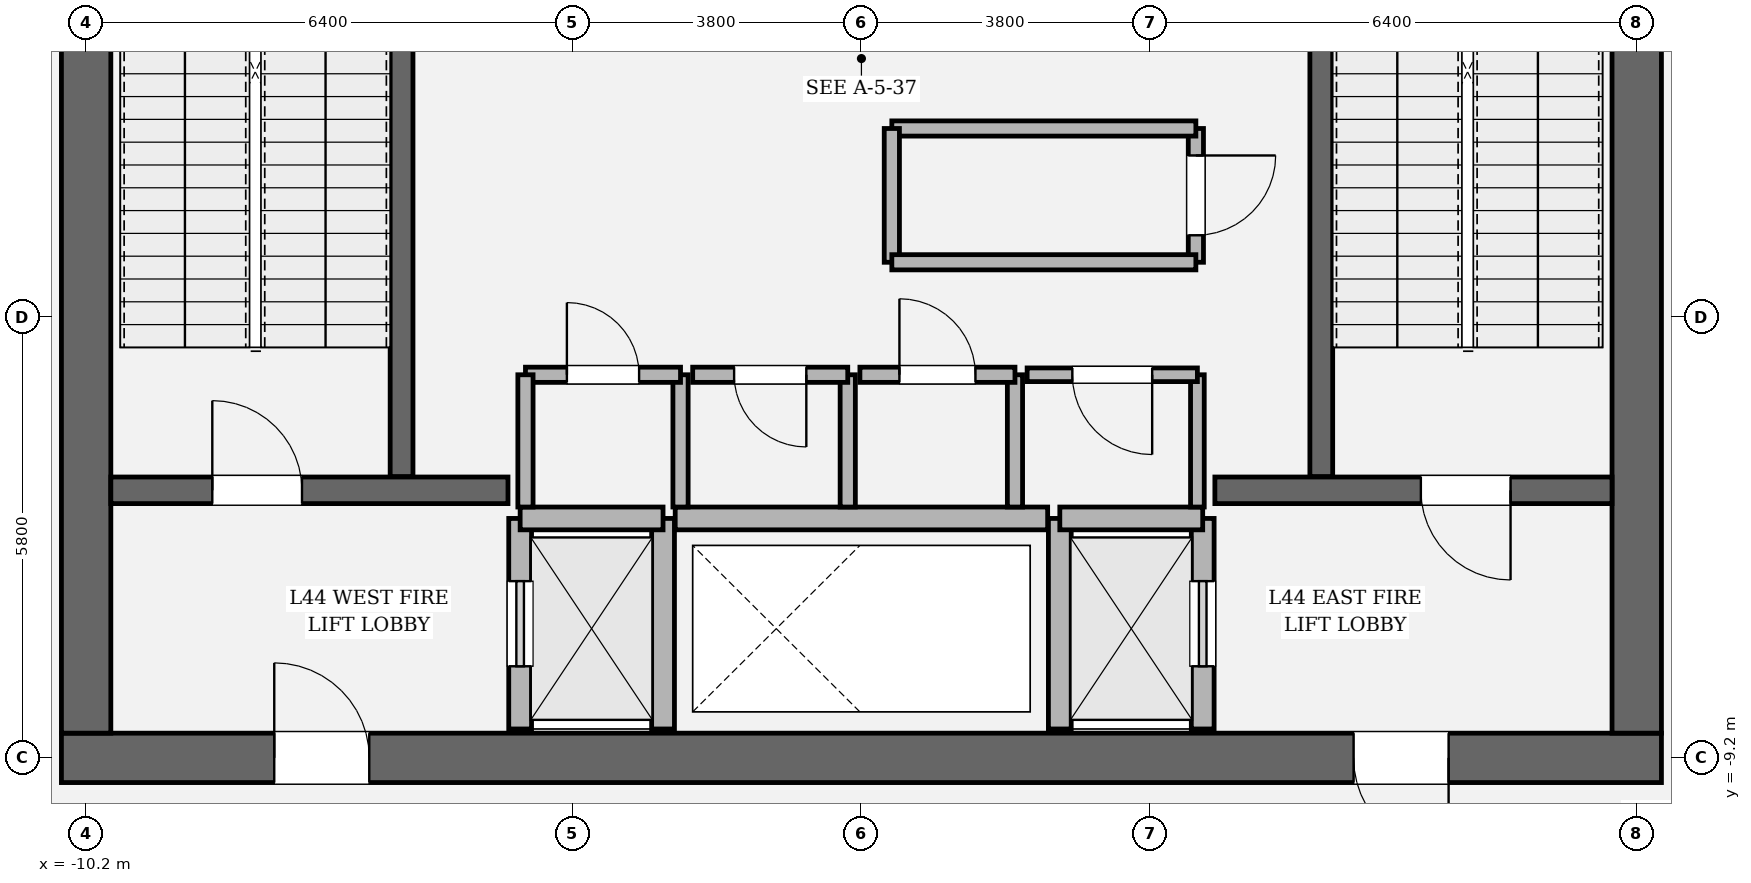
"""IFC4 building model, lengths in metres.
Left out: names, types, materials, properties, quantities, classifications, styles, units other than length and angle.
Written with IfcOpenShell. Run it as: python <this file> out.ifc"""

import sys

from ifc_helpers import new_model, si_unit, direction, frame, frame_2d, origin, place, context, subcontext, project, spatial, rectangle, extrude, element, fill, save


model = new_model("IFC4")
c1 = context("Model", 3, precision=1e-05, world=origin(), true_north=direction((0.0, 1.0)))
c2 = subcontext(c1, "Body", "Model", "MODEL_VIEW")
j1 = project(units=[si_unit("LENGTHUNIT", "METRE"), si_unit("PLANEANGLEUNIT", "RADIAN")], contexts=[c1])
p1 = place(None, origin())
s1 = spatial("IfcSite", under=j1, at=p1, CompositionType="ELEMENT")
p2 = place(p1, origin())
s2 = spatial("IfcBuilding", under=s1, at=p2, CompositionType="ELEMENT")
p3 = place(p2, frame((0.0, 0.0, 188.4)))
s3 = spatial("IfcBuildingStorey", under=s2, at=p3, CompositionType="ELEMENT", Elevation=188.4)
p4 = place(p3, frame((10.525, -9.2, 0.0), z_axis=(0.0, 0.0, 1.0), x_axis=(-1.0, 0.0, 0.0)))
e1 = element("IfcWall", 1, at=p4, inside=s3, PredefinedType="SHEAR", context=c2, shape_type="SweptSolid", body=[
    extrude(rectangle(XDim=21.05, YDim=0.65, at=frame_2d((10.525, 0.0))), origin(), (0.0, 0.0, 1.0), 4.05),
])
p5 = place(p4, frame((2.8, 0.0, 0.0)))
e2 = element("IfcOpeningElement", 2, at=p5, cuts=e1, PredefinedType="OPENING", context=c2, shape_type="SweptSolid", body=[
    extrude(rectangle(XDim=1.25, YDim=2.25, at=frame_2d((0.625, 1.125))), frame((0.0, 0.335, 0.0), z_axis=(0.0, -1.0, 0.0), x_axis=(1.0, 0.0, 0.0)), (0.0, 0.0, 1.0), 0.67),
])
p6 = place(p4, frame((17.0, 0.0, 0.0)))
e3 = element("IfcOpeningElement", 3, at=p6, cuts=e1, PredefinedType="OPENING", context=c2, shape_type="SweptSolid", body=[
    extrude(rectangle(XDim=1.25, YDim=2.25, at=frame_2d((0.625, 1.125))), frame((0.0, 0.335, 0.0), z_axis=(0.0, -1.0, 0.0), x_axis=(1.0, 0.0, 0.0)), (0.0, 0.0, 1.0), 0.67),
])
p7 = place(p3, frame((-10.2, -8.875, 0.0), z_axis=(0.0, 0.0, 1.0), x_axis=(0.0, 1.0, 0.0)))
e4 = element("IfcWall", 4, at=p7, inside=s3, PredefinedType="SHEAR", context=c2, shape_type="SweptSolid", body=[
    extrude(rectangle(XDim=17.75, YDim=0.65, at=frame_2d((8.875, 0.0))), origin(), (0.0, 0.0, 1.0), 4.05),
])
p8 = place(p7, frame((12.665, 0.0, 0.0)))
e5 = element("IfcOpeningElement", 5, at=p8, cuts=e4, PredefinedType="OPENING", context=c2, shape_type="SweptSolid", body=[
    extrude(rectangle(XDim=1.18, YDim=2.2, at=frame_2d((0.59, 1.1))), frame((0.0, 0.335, 0.0), z_axis=(0.0, -1.0, 0.0), x_axis=(1.0, 0.0, 0.0)), (0.0, 0.0, 1.0), 0.67),
])
p9 = place(p3, frame((10.2, 8.875, 0.0), z_axis=(0.0, 0.0, 1.0), x_axis=(0.0, -1.0, 0.0)))
e6 = element("IfcWall", 6, at=p9, inside=s3, PredefinedType="SHEAR", context=c2, shape_type="SweptSolid", body=[
    extrude(rectangle(XDim=17.75, YDim=0.65, at=frame_2d((8.875, 0.0))), origin(), (0.0, 0.0, 1.0), 4.05),
])
p10 = place(p9, frame((3.905, 0.0, 0.0)))
e7 = element("IfcOpeningElement", 7, at=p10, cuts=e6, PredefinedType="OPENING", context=c2, shape_type="SweptSolid", body=[
    extrude(rectangle(XDim=1.18, YDim=2.2, at=frame_2d((0.59, 1.1))), frame((0.0, 0.335, 0.0), z_axis=(0.0, -1.0, 0.0), x_axis=(1.0, 0.0, 0.0)), (0.0, 0.0, 1.0), 0.67),
])
for number, where, z_axis, x_axis in (
    (8, (-6.05, -5.5, 0.0), (0.0, 0.0, 1.0), (0.0, 1.0, 0.0)),
    (9, (6.05, 3.45, 0.0), (0.0, 0.0, 1.0), (0.0, -1.0, 0.0)),
):
    element("IfcWall", number, at=place(p3, frame(where, z_axis=z_axis, x_axis=x_axis)), inside=s3, PredefinedType="SOLIDWALL", context=c2, shape_type="SweptSolid", body=[
        extrude(rectangle(XDim=8.95, YDim=0.3, at=frame_2d((4.475, 0.0))), origin(), (0.0, 0.0, 1.0), 4.05),
    ])
p11 = place(p3, frame((-9.875, -5.68, 0.0), z_axis=(0.0, 0.0, 1.0), x_axis=(1.0, 0.0, 0.0)))
e10 = element("IfcWall", 10, at=p11, inside=s3, PredefinedType="SOLIDWALL", context=c2, shape_type="SweptSolid", body=[
    extrude(rectangle(XDim=5.225, YDim=0.35, at=frame_2d((2.613, 0.0))), origin(), (0.0, 0.0, 1.0), 4.05),
])
p12 = place(p11, frame((1.335, 0.0, 0.0)))
e11 = element("IfcOpeningElement", 11, at=p12, cuts=e10, PredefinedType="OPENING", context=c2, shape_type="SweptSolid", body=[
    extrude(rectangle(XDim=1.18, YDim=2.2, at=frame_2d((0.59, 1.1))), frame((0.0, 0.185, 0.0), z_axis=(0.0, -1.0, 0.0), x_axis=(1.0, 0.0, 0.0)), (0.0, 0.0, 1.0), 0.37),
])
p13 = place(p3, frame((4.65, -5.68, 0.0), z_axis=(0.0, 0.0, 1.0), x_axis=(1.0, 0.0, 0.0)))
e12 = element("IfcWall", 12, at=p13, inside=s3, PredefinedType="SOLIDWALL", context=c2, shape_type="SweptSolid", body=[
    extrude(rectangle(XDim=5.225, YDim=0.35, at=frame_2d((2.613, 0.0))), origin(), (0.0, 0.0, 1.0), 4.05),
])
p14 = place(p13, frame((2.71, 0.0, 0.0)))
e13 = element("IfcOpeningElement", 13, at=p14, cuts=e12, PredefinedType="OPENING", context=c2, shape_type="SweptSolid", body=[
    extrude(rectangle(XDim=1.18, YDim=2.2, at=frame_2d((0.59, 1.1))), frame((0.0, 0.185, 0.0), z_axis=(0.0, -1.0, 0.0), x_axis=(1.0, 0.0, 0.0)), (0.0, 0.0, 1.0), 0.37),
])
p15 = place(p3, frame((-4.49, -8.82, 0.0), z_axis=(0.0, 0.0, 1.0), x_axis=(0.0, 1.0, 0.0)))
e14 = element("IfcWall", 14, at=p15, inside=s3, PredefinedType="SOLIDWALL", context=c2, shape_type="SweptSolid", body=[
    extrude(rectangle(XDim=2.77, YDim=0.3, at=frame_2d((1.385, 0.0))), origin(), (0.0, 0.0, 1.0), 3.83),
])
p16 = place(p15, frame((0.825, 0.0, 0.0)))
e15 = element("IfcOpeningElement", 15, at=p16, cuts=e14, PredefinedType="OPENING", context=c2, shape_type="SweptSolid", body=[
    extrude(rectangle(XDim=1.12, YDim=2.25, at=frame_2d((0.56, 1.125))), frame((0.0, 0.16, 0.0), z_axis=(0.0, -1.0, 0.0), x_axis=(1.0, 0.0, 0.0)), (0.0, 0.0, 1.0), 0.32),
])
p17 = place(p3, frame((-2.61, -8.82, 0.0), z_axis=(0.0, 0.0, 1.0), x_axis=(0.0, 1.0, 0.0)))
e16 = element("IfcWall", 16, at=p17, inside=s3, PredefinedType="SOLIDWALL", context=c2, shape_type="SweptSolid", body=[
    extrude(rectangle(XDim=2.77, YDim=0.3, at=frame_2d((1.385, 0.0))), origin(), (0.0, 0.0, 1.0), 3.83),
])
p18 = place(p3, frame((-4.49, -6.05, 0.0), z_axis=(0.0, 0.0, 1.0), x_axis=(1.0, 0.0, 0.0)))
e17 = element("IfcWall", 17, at=p18, inside=s3, PredefinedType="SOLIDWALL", context=c2, shape_type="SweptSolid", body=[
    extrude(rectangle(XDim=1.88, YDim=0.3, at=frame_2d((0.94, 0.0))), origin(), (0.0, 0.0, 1.0), 3.83),
])
p19 = place(p3, frame((4.49, -8.82, 0.0), z_axis=(0.0, 0.0, 1.0), x_axis=(0.0, 1.0, 0.0)))
e18 = element("IfcWall", 18, at=p19, inside=s3, PredefinedType="SOLIDWALL", context=c2, shape_type="SweptSolid", body=[
    extrude(rectangle(XDim=2.77, YDim=0.3, at=frame_2d((1.385, 0.0))), origin(), (0.0, 0.0, 1.0), 3.83),
])
p20 = place(p19, frame((0.825, 0.0, 0.0)))
e19 = element("IfcOpeningElement", 19, at=p20, cuts=e18, PredefinedType="OPENING", context=c2, shape_type="SweptSolid", body=[
    extrude(rectangle(XDim=1.12, YDim=2.25, at=frame_2d((0.56, 1.125))), frame((0.0, 0.16, 0.0), z_axis=(0.0, -1.0, 0.0), x_axis=(1.0, 0.0, 0.0)), (0.0, 0.0, 1.0), 0.32),
])
p21 = place(p3, frame((2.61, -8.82, 0.0), z_axis=(0.0, 0.0, 1.0), x_axis=(0.0, 1.0, 0.0)))
e20 = element("IfcWall", 20, at=p21, inside=s3, PredefinedType="SOLIDWALL", context=c2, shape_type="SweptSolid", body=[
    extrude(rectangle(XDim=2.77, YDim=0.3, at=frame_2d((1.385, 0.0))), origin(), (0.0, 0.0, 1.0), 3.83),
])
p22 = place(p3, frame((2.61, -6.05, 0.0), z_axis=(0.0, 0.0, 1.0), x_axis=(1.0, 0.0, 0.0)))
e21 = element("IfcWall", 21, at=p22, inside=s3, PredefinedType="SOLIDWALL", context=c2, shape_type="SweptSolid", body=[
    extrude(rectangle(XDim=1.88, YDim=0.3, at=frame_2d((0.94, 0.0))), origin(), (0.0, 0.0, 1.0), 3.83),
])
p23 = place(p3, frame((-2.45, -6.05, 0.0), z_axis=(0.0, 0.0, 1.0), x_axis=(1.0, 0.0, 0.0)))
e22 = element("IfcWall", 22, at=p23, inside=s3, PredefinedType="SOLIDWALL", context=c2, shape_type="SweptSolid", body=[
    extrude(rectangle(XDim=4.9, YDim=0.3, at=frame_2d((2.45, 0.0))), origin(), (0.0, 0.0, 1.0), 3.83),
])
p24 = place(p3, frame((-2.38, -5.9, 0.0), z_axis=(0.0, 0.0, 1.0), x_axis=(0.0, 1.0, 0.0)))
e23 = element("IfcWall", 23, at=p24, inside=s3, PredefinedType="SOLIDWALL", context=c2, shape_type="SweptSolid", body=[
    extrude(rectangle(XDim=1.74, YDim=0.2, at=frame_2d((0.87, 0.0))), origin(), (0.0, 0.0, 1.0), 3.83),
])
p25 = place(p3, frame((-2.38, -4.16, 0.0), z_axis=(0.0, 0.0, 1.0), x_axis=(-1.0, 0.0, 0.0)))
e24 = element("IfcWall", 24, at=p25, inside=s3, PredefinedType="SOLIDWALL", context=c2, shape_type="SweptSolid", body=[
    extrude(rectangle(XDim=2.04, YDim=0.2, at=frame_2d((1.02, 0.0))), origin(), (0.0, 0.0, 1.0), 3.83),
])
p26 = place(p25, frame((0.545, 0.0, 0.0)))
e25 = element("IfcOpeningElement", 25, at=p26, cuts=e24, PredefinedType="OPENING", context=c2, shape_type="SweptSolid", body=[
    extrude(rectangle(XDim=0.95, YDim=2.15, at=frame_2d((0.475, 1.075))), frame((0.0, 0.11, 0.0), z_axis=(0.0, -1.0, 0.0), x_axis=(1.0, 0.0, 0.0)), (0.0, 0.0, 1.0), 0.22),
])
for number, where, z_axis, x_axis in (
    (26, (-4.42, -4.16, 0.0), (0.0, 0.0, 1.0), (0.0, -1.0, 0.0)),
    (27, (-0.18, -5.9, 0.0), (0.0, 0.0, 1.0), (0.0, 1.0, 0.0)),
):
    element("IfcWall", number, at=place(p3, frame(where, z_axis=z_axis, x_axis=x_axis)), inside=s3, PredefinedType="SOLIDWALL", context=c2, shape_type="SweptSolid", body=[
        extrude(rectangle(XDim=1.74, YDim=0.2, at=frame_2d((0.87, 0.0))), origin(), (0.0, 0.0, 1.0), 3.83),
    ])
p27 = place(p3, frame((-0.18, -4.16, 0.0), z_axis=(0.0, 0.0, 1.0), x_axis=(-1.0, 0.0, 0.0)))
e28 = element("IfcWall", 28, at=p27, inside=s3, PredefinedType="SOLIDWALL", context=c2, shape_type="SweptSolid", body=[
    extrude(rectangle(XDim=2.04, YDim=0.2, at=frame_2d((1.02, 0.0))), origin(), (0.0, 0.0, 1.0), 3.83),
])
p28 = place(p27, frame((0.545, 0.0, 0.0)))
e29 = element("IfcOpeningElement", 29, at=p28, cuts=e28, PredefinedType="OPENING", context=c2, shape_type="SweptSolid", body=[
    extrude(rectangle(XDim=0.95, YDim=2.15, at=frame_2d((0.475, 1.075))), frame((0.0, 0.11, 0.0), z_axis=(0.0, -1.0, 0.0), x_axis=(1.0, 0.0, 0.0)), (0.0, 0.0, 1.0), 0.22),
])
p29 = place(p3, frame((2.02, -5.9, 0.0), z_axis=(0.0, 0.0, 1.0), x_axis=(0.0, 1.0, 0.0)))
e30 = element("IfcWall", 30, at=p29, inside=s3, PredefinedType="SOLIDWALL", context=c2, shape_type="SweptSolid", body=[
    extrude(rectangle(XDim=1.74, YDim=0.2, at=frame_2d((0.87, 0.0))), origin(), (0.0, 0.0, 1.0), 3.83),
])
p30 = place(p3, frame((2.02, -4.16, 0.0), z_axis=(0.0, 0.0, 1.0), x_axis=(-1.0, 0.0, 0.0)))
e31 = element("IfcWall", 31, at=p30, inside=s3, PredefinedType="SOLIDWALL", context=c2, shape_type="SweptSolid", body=[
    extrude(rectangle(XDim=2.04, YDim=0.2, at=frame_2d((1.02, 0.0))), origin(), (0.0, 0.0, 1.0), 3.83),
])
p31 = place(p30, frame((0.52, 0.0, 0.0)))
e32 = element("IfcOpeningElement", 32, at=p31, cuts=e31, PredefinedType="OPENING", context=c2, shape_type="SweptSolid", body=[
    extrude(rectangle(XDim=1.0, YDim=2.15, at=frame_2d((0.5, 1.075))), frame((0.0, 0.11, 0.0), z_axis=(0.0, -1.0, 0.0), x_axis=(1.0, 0.0, 0.0)), (0.0, 0.0, 1.0), 0.22),
])
p32 = place(p3, frame((4.42, -5.9, 0.0), z_axis=(0.0, 0.0, 1.0), x_axis=(0.0, 1.0, 0.0)))
e33 = element("IfcWall", 33, at=p32, inside=s3, PredefinedType="PARTITIONING", context=c2, shape_type="SweptSolid", body=[
    extrude(rectangle(XDim=1.74, YDim=0.18, at=frame_2d((0.87, 0.0))), origin(), (0.0, 0.0, 1.0), 3.83),
])
p33 = place(p3, frame((4.42, -4.16, 0.0), z_axis=(0.0, 0.0, 1.0), x_axis=(-1.0, 0.0, 0.0)))
e34 = element("IfcWall", 34, at=p33, inside=s3, PredefinedType="PARTITIONING", context=c2, shape_type="SweptSolid", body=[
    extrude(rectangle(XDim=2.24, YDim=0.18, at=frame_2d((1.12, 0.0))), origin(), (0.0, 0.0, 1.0), 3.83),
])
p34 = place(p33, frame((0.595, 0.0, 0.0)))
e35 = element("IfcOpeningElement", 35, at=p34, cuts=e34, PredefinedType="OPENING", context=c2, shape_type="SweptSolid", body=[
    extrude(rectangle(XDim=1.05, YDim=2.2, at=frame_2d((0.525, 1.1))), frame((0.0, 0.1, 0.0), z_axis=(0.0, -1.0, 0.0), x_axis=(1.0, 0.0, 0.0)), (0.0, 0.0, 1.0), 0.2),
])
p35 = place(p3, frame((4.4, -2.68, 0.0), z_axis=(0.0, 0.0, 1.0), x_axis=(0.0, 1.0, 0.0)))
e36 = element("IfcWall", 36, at=p35, inside=s3, PredefinedType="SOLIDWALL", context=c2, shape_type="SweptSolid", body=[
    extrude(rectangle(XDim=1.76, YDim=0.2, at=frame_2d((0.88, 0.0))), origin(), (0.0, 0.0, 1.0), 3.83),
])
p36 = place(p35, frame((0.355, 0.0, 0.0)))
e37 = element("IfcOpeningElement", 37, at=p36, cuts=e36, PredefinedType="OPENING", context=c2, shape_type="SweptSolid", body=[
    extrude(rectangle(XDim=1.05, YDim=2.2, at=frame_2d((0.525, 1.1))), frame((0.0, 0.11, 0.0), z_axis=(0.0, -1.0, 0.0), x_axis=(1.0, 0.0, 0.0)), (0.0, 0.0, 1.0), 0.22),
])
p37 = place(p3, frame((4.4, -0.92, 0.0), z_axis=(0.0, 0.0, 1.0), x_axis=(-1.0, 0.0, 0.0)))
e38 = element("IfcWall", 38, at=p37, inside=s3, PredefinedType="SOLIDWALL", context=c2, shape_type="SweptSolid", body=[
    extrude(rectangle(XDim=4.0, YDim=0.2, at=frame_2d((2.0, 0.0))), origin(), (0.0, 0.0, 1.0), 3.83),
])
p38 = place(p3, frame((0.4, -0.92, 0.0), z_axis=(0.0, 0.0, 1.0), x_axis=(0.0, -1.0, 0.0)))
e39 = element("IfcWall", 39, at=p38, inside=s3, PredefinedType="SOLIDWALL", context=c2, shape_type="SweptSolid", body=[
    extrude(rectangle(XDim=1.76, YDim=0.2, at=frame_2d((0.88, 0.0))), origin(), (0.0, 0.0, 1.0), 3.83),
])
p39 = place(p3, frame((0.4, -2.68, 0.0), z_axis=(0.0, 0.0, 1.0), x_axis=(1.0, 0.0, 0.0)))
e40 = element("IfcWall", 40, at=p39, inside=s3, PredefinedType="SOLIDWALL", context=c2, shape_type="SweptSolid", body=[
    extrude(rectangle(XDim=4.0, YDim=0.2, at=frame_2d((2.0, 0.0))), origin(), (0.0, 0.0, 1.0), 3.83),
])
p40 = place(p12, origin())
e41 = element("IfcDoor", 41, at=p40, inside=s3, OperationType="SINGLE_SWING_LEFT", PredefinedType="DOOR", context=c2, shape_type="SweptSolid", body=[
    extrude(rectangle(XDim=1.18, YDim=2.2, at=frame_2d((0.59, 1.1))), frame((0.0, 0.025, 0.0), z_axis=(0.0, -1.0, 0.0), x_axis=(1.0, 0.0, 0.0)), (0.0, 0.0, 1.0), 0.05),
])
fill(e11, e41)
p41 = place(p14, origin())
e42 = element("IfcDoor", 42, at=p41, inside=s3, OperationType="SINGLE_SWING_RIGHT", PredefinedType="DOOR", context=c2, shape_type="SweptSolid", body=[
    extrude(rectangle(XDim=1.18, YDim=2.2, at=frame_2d((0.59, 1.1))), frame((0.0, 0.025, 0.0), z_axis=(0.0, -1.0, 0.0), x_axis=(1.0, 0.0, 0.0)), (0.0, 0.0, 1.0), 0.05),
])
fill(e13, e42)
p42 = place(p5, origin())
e43 = element("IfcDoor", 43, at=p42, inside=s3, OperationType="SINGLE_SWING_LEFT", PredefinedType="DOOR", context=c2, shape_type="SweptSolid", body=[
    extrude(rectangle(XDim=1.25, YDim=2.25, at=frame_2d((0.625, 1.125))), frame((0.0, 0.025, 0.0), z_axis=(0.0, -1.0, 0.0), x_axis=(1.0, 0.0, 0.0)), (0.0, 0.0, 1.0), 0.05),
])
fill(e2, e43)
p43 = place(p6, origin())
e44 = element("IfcDoor", 44, at=p43, inside=s3, OperationType="SINGLE_SWING_RIGHT", PredefinedType="DOOR", context=c2, shape_type="SweptSolid", body=[
    extrude(rectangle(XDim=1.25, YDim=2.25, at=frame_2d((0.625, 1.125))), frame((0.0, 0.025, 0.0), z_axis=(0.0, -1.0, 0.0), x_axis=(1.0, 0.0, 0.0)), (0.0, 0.0, 1.0), 0.05),
])
fill(e3, e44)
p44 = place(p16, origin())
e45 = element("IfcDoor", 45, at=p44, inside=s3, OperationType="SLIDING_TO_LEFT", PredefinedType="DOOR", context=c2, shape_type="SweptSolid", body=[
    extrude(rectangle(XDim=1.12, YDim=2.25, at=frame_2d((0.56, 1.125))), frame((0.0, 0.025, 0.0), z_axis=(0.0, -1.0, 0.0), x_axis=(1.0, 0.0, 0.0)), (0.0, 0.0, 1.0), 0.05),
])
fill(e15, e45)
p45 = place(p20, origin())
e46 = element("IfcDoor", 46, at=p45, inside=s3, OperationType="SLIDING_TO_RIGHT", PredefinedType="DOOR", context=c2, shape_type="SweptSolid", body=[
    extrude(rectangle(XDim=1.12, YDim=2.25, at=frame_2d((0.56, 1.125))), frame((0.0, 0.025, 0.0), z_axis=(0.0, -1.0, 0.0), x_axis=(1.0, 0.0, 0.0)), (0.0, 0.0, 1.0), 0.05),
])
fill(e19, e46)
p46 = place(p26, origin())
e47 = element("IfcDoor", 47, at=p46, inside=s3, OperationType="SINGLE_SWING_RIGHT", PredefinedType="DOOR", context=c2, shape_type="SweptSolid", body=[
    extrude(rectangle(XDim=0.95, YDim=2.15, at=frame_2d((0.475, 1.075))), frame((0.0, 0.025, 0.0), z_axis=(0.0, -1.0, 0.0), x_axis=(1.0, 0.0, 0.0)), (0.0, 0.0, 1.0), 0.05),
])
fill(e25, e47)
p47 = place(p28, origin())
e48 = element("IfcDoor", 48, at=p47, inside=s3, OperationType="SINGLE_SWING_LEFT", PredefinedType="DOOR", context=c2, shape_type="SweptSolid", body=[
    extrude(rectangle(XDim=0.95, YDim=2.15, at=frame_2d((0.475, 1.075))), frame((0.0, 0.025, 0.0), z_axis=(0.0, -1.0, 0.0), x_axis=(1.0, 0.0, 0.0)), (0.0, 0.0, 1.0), 0.05),
])
fill(e29, e48)
p48 = place(p31, origin())
e49 = element("IfcDoor", 49, at=p48, inside=s3, OperationType="SINGLE_SWING_RIGHT", PredefinedType="DOOR", context=c2, shape_type="SweptSolid", body=[
    extrude(rectangle(XDim=1.0, YDim=2.15, at=frame_2d((0.5, 1.075))), frame((0.0, 0.025, 0.0), z_axis=(0.0, -1.0, 0.0), x_axis=(1.0, 0.0, 0.0)), (0.0, 0.0, 1.0), 0.05),
])
fill(e32, e49)
p49 = place(p34, origin())
e50 = element("IfcDoor", 50, at=p49, inside=s3, OperationType="SINGLE_SWING_LEFT", PredefinedType="DOOR", context=c2, shape_type="SweptSolid", body=[
    extrude(rectangle(XDim=1.05, YDim=2.2, at=frame_2d((0.525, 1.1))), frame((0.0, 0.025, 0.0), z_axis=(0.0, -1.0, 0.0), x_axis=(1.0, 0.0, 0.0)), (0.0, 0.0, 1.0), 0.05),
])
fill(e35, e50)
p50 = place(p36, origin())
e51 = element("IfcDoor", 51, at=p50, inside=s3, OperationType="SINGLE_SWING_RIGHT", PredefinedType="DOOR", context=c2, shape_type="SweptSolid", body=[
    extrude(rectangle(XDim=1.05, YDim=2.2, at=frame_2d((0.525, 1.1))), frame((0.0, 0.025, 0.0), z_axis=(0.0, -1.0, 0.0), x_axis=(1.0, 0.0, 0.0)), (0.0, 0.0, 1.0), 0.05),
])
fill(e37, e51)
save(model, sys.argv[1])
